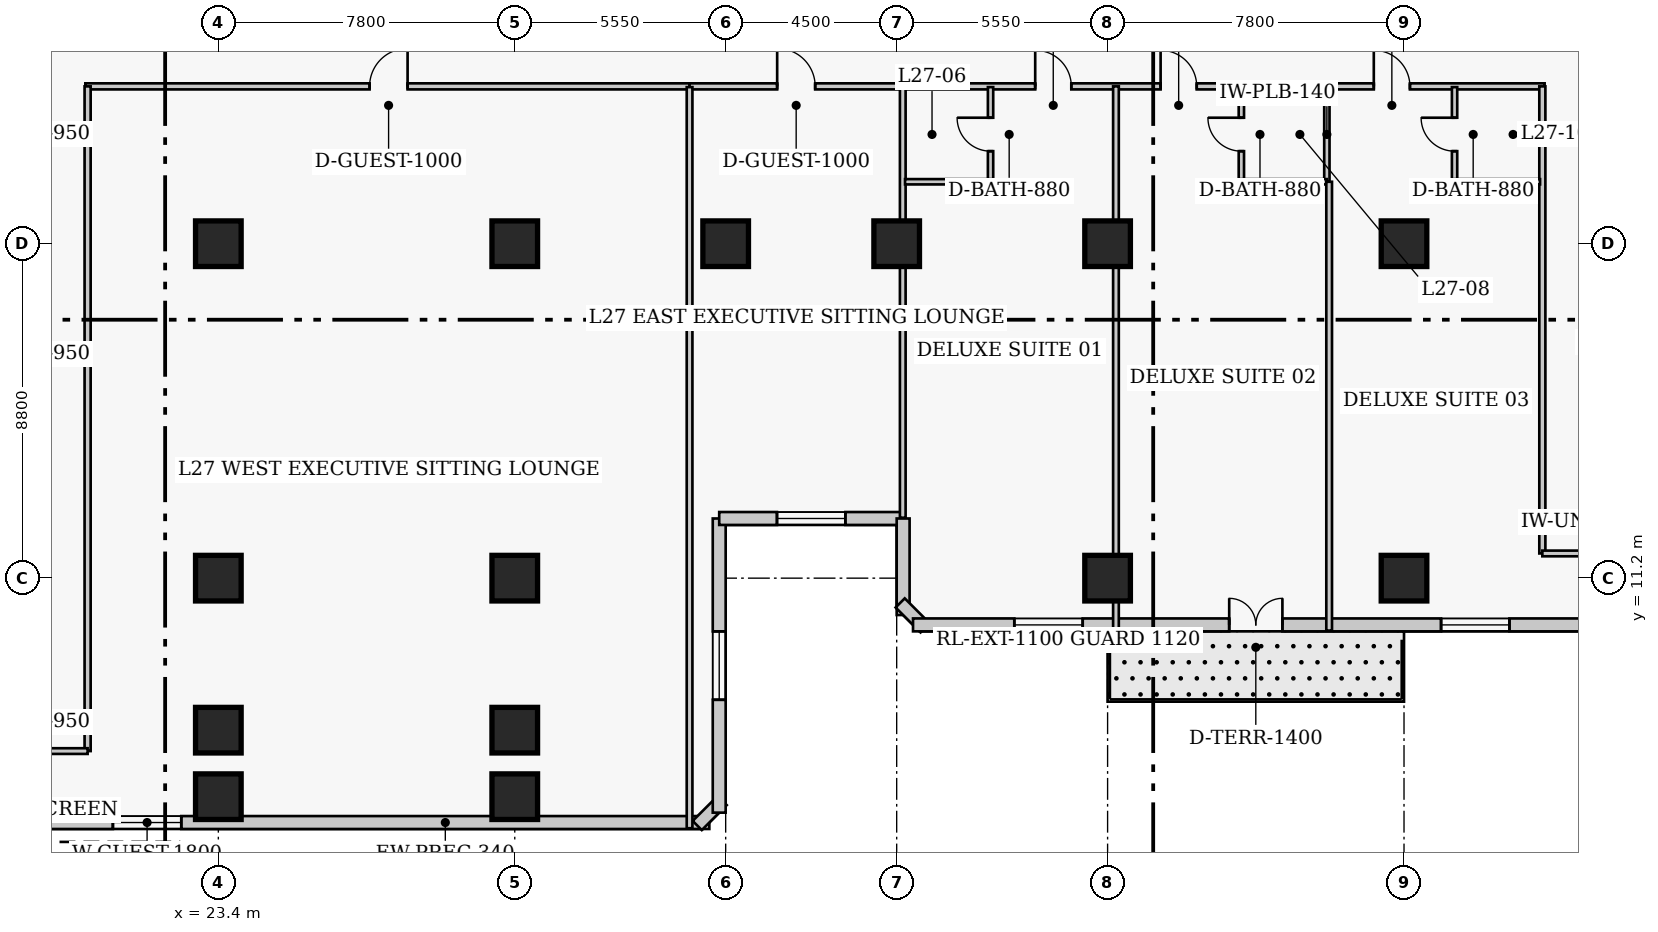
"""IFC4 building model, lengths in metres.
Left out: names, types, materials, properties, quantities, classifications, styles, units other than length and angle.
Written with IfcOpenShell. Run it as: python <this file> out.ifc"""

import sys

from ifc_helpers import new_model, si_unit, direction, frame, frame_2d, origin, origin_2d, place, context, subcontext, project, spatial, rectangle, extrude, element, fill, save


model = new_model("IFC4")
c1 = context("Model", 3, precision=1e-05, world=origin(), true_north=direction((0.0, 1.0)))
c2 = subcontext(c1, "Body", "Model", "MODEL_VIEW")
j1 = project(units=[si_unit("LENGTHUNIT", "METRE"), si_unit("PLANEANGLEUNIT", "RADIAN")], contexts=[c1])
p1 = place(None, origin())
s1 = spatial("IfcSite", under=j1, at=p1, CompositionType="ELEMENT")
p2 = place(p1, origin())
s2 = spatial("IfcBuilding", under=s1, at=p2, CompositionType="ELEMENT")
p3 = place(p2, frame((0.0, 0.0, 110.8)))
s3 = spatial("IfcBuildingStorey", under=s2, at=p3, CompositionType="ELEMENT", Elevation=110.8)
for number, where, z_axis, x_axis in (
    (1, (23.4, 11.2, 0.0), (0.0, 0.0, 1.0), (1.0, 0.0, 0.0)),
    (2, (23.4, 20.0, 0.0), (0.0, 0.0, 1.0), (1.0, 0.0, 0.0)),
    (3, (31.2, 11.2, 0.0), (0.0, 0.0, 1.0), (1.0, 0.0, 0.0)),
    (4, (31.2, 20.0, 0.0), (0.0, 0.0, 1.0), (1.0, 0.0, 0.0)),
    (5, (36.75, 20.0, 0.0), (0.0, 0.0, 1.0), (1.0, 0.0, 0.0)),
    (6, (41.25, 20.0, 0.0), (0.0, 0.0, 1.0), (1.0, 0.0, 0.0)),
    (7, (46.8, 11.2, 0.0), (0.0, 0.0, 1.0), (1.0, 0.0, 0.0)),
    (8, (46.8, 20.0, 0.0), (0.0, 0.0, 1.0), (1.0, 0.0, 0.0)),
    (9, (54.6, 11.2, 0.0), (0.0, 0.0, 1.0), (1.0, 0.0, 0.0)),
    (10, (54.6, 20.0, 0.0), (0.0, 0.0, 1.0), (1.0, 0.0, 0.0)),
    (11, (23.4, 7.2, 0.0), (0.0, 0.0, 1.0), (1.0, 0.0, 0.0)),
    (12, (31.2, 7.2, 0.0), (0.0, 0.0, 1.0), (1.0, 0.0, 0.0)),
    (13, (23.4, 5.45, 0.0), (0.0, 0.0, 1.0), (1.0, 0.0, 0.0)),
    (14, (31.2, 5.45, 0.0), (0.0, 0.0, 1.0), (1.0, 0.0, 0.0)),
):
    element("IfcColumn", number, at=place(p3, frame(where, z_axis=z_axis, x_axis=x_axis)), inside=s3, PredefinedType="COLUMN", context=c2, shape_type="SweptSolid", body=[
        extrude(rectangle(XDim=1.2, YDim=1.2, at=origin_2d()), origin(), (0.0, 0.0, 1.0), 3.8),
    ])
p4 = place(p3, frame((8.03, 4.77, 0.0), z_axis=(0.0, 0.0, 1.0), x_axis=(1.0, 0.0, 0.0)))
e15 = element("IfcWall", 15, at=p4, inside=s3, PredefinedType="SOLIDWALL", context=c2, shape_type="SweptSolid", body=[
    extrude(rectangle(XDim=28.29, YDim=0.34, at=frame_2d((14.145, 0.0))), origin(), (0.0, 0.0, 1.0), 3.54),
])
p5 = place(p4, frame((12.595, 0.0, 0.85)))
e16 = element("IfcOpeningElement", 16, at=p5, cuts=e15, PredefinedType="OPENING", context=c2, shape_type="SweptSolid", body=[
    extrude(rectangle(XDim=1.8, YDim=1.8, at=frame_2d((0.9, 0.9))), frame((0.0, 0.18, 0.0), z_axis=(0.0, -1.0, 0.0), x_axis=(1.0, 0.0, 0.0)), (0.0, 0.0, 1.0), 0.36),
])
p6 = place(p3, frame((36.001, 4.692, 0.0), z_axis=(0.0, 0.0, 1.0), x_axis=(0.707238225886, 0.706975312048, 0.0)))
e17 = element("IfcWall", 17, at=p6, inside=s3, PredefinedType="SOLIDWALL", context=c2, shape_type="SweptSolid", body=[
    extrude(rectangle(XDim=0.929, YDim=0.34, at=frame_2d((0.464, 0.0))), origin(), (0.0, 0.0, 1.0), 3.54),
])
p7 = place(p3, frame((36.58, 5.03, 0.0), z_axis=(0.0, 0.0, 1.0), x_axis=(0.0, 1.0, 0.0)))
e18 = element("IfcWall", 18, at=p7, inside=s3, PredefinedType="SOLIDWALL", context=c2, shape_type="SweptSolid", body=[
    extrude(rectangle(XDim=7.74, YDim=0.34, at=frame_2d((3.87, 0.0))), origin(), (0.0, 0.0, 1.0), 3.54),
])
p8 = place(p7, frame((2.97, 0.0, 0.85)))
e19 = element("IfcOpeningElement", 19, at=p8, cuts=e18, PredefinedType="OPENING", context=c2, shape_type="SweptSolid", body=[
    extrude(rectangle(XDim=1.8, YDim=1.8, at=frame_2d((0.9, 0.9))), frame((0.0, 0.18, 0.0), z_axis=(0.0, -1.0, 0.0), x_axis=(1.0, 0.0, 0.0)), (0.0, 0.0, 1.0), 0.36),
])
p9 = place(p3, frame((36.58, 12.77, 0.0), z_axis=(0.0, 0.0, 1.0), x_axis=(1.0, 0.0, 0.0)))
e20 = element("IfcWall", 20, at=p9, inside=s3, PredefinedType="SOLIDWALL", context=c2, shape_type="SweptSolid", body=[
    extrude(rectangle(XDim=4.84, YDim=0.34, at=frame_2d((2.42, 0.0))), origin(), (0.0, 0.0, 1.0), 3.54),
])
p10 = place(p9, frame((1.52, 0.0, 0.85)))
e21 = element("IfcOpeningElement", 21, at=p10, cuts=e20, PredefinedType="OPENING", context=c2, shape_type="SweptSolid", body=[
    extrude(rectangle(XDim=1.8, YDim=1.8, at=frame_2d((0.9, 0.9))), frame((0.0, 0.18, 0.0), z_axis=(0.0, -1.0, 0.0), x_axis=(1.0, 0.0, 0.0)), (0.0, 0.0, 1.0), 0.36),
])
p11 = place(p3, frame((41.42, 12.77, 0.0), z_axis=(0.0, 0.0, 1.0), x_axis=(0.0, -1.0, 0.0)))
e22 = element("IfcWall", 22, at=p11, inside=s3, PredefinedType="SOLIDWALL", context=c2, shape_type="SweptSolid", body=[
    extrude(rectangle(XDim=2.54, YDim=0.34, at=frame_2d((1.27, 0.0))), origin(), (0.0, 0.0, 1.0), 3.54),
])
p12 = place(p3, frame((41.342, 10.549, 0.0), z_axis=(0.0, 0.0, 1.0), x_axis=(0.707106781187, -0.707106781187, 0.0)))
e23 = element("IfcWall", 23, at=p12, inside=s3, PredefinedType="SOLIDWALL", context=c2, shape_type="SweptSolid", body=[
    extrude(rectangle(XDim=0.929, YDim=0.34, at=frame_2d((0.464, 0.0))), origin(), (0.0, 0.0, 1.0), 3.54),
])
p13 = place(p3, frame((41.68, 9.97, 0.0), z_axis=(0.0, 0.0, 1.0), x_axis=(1.0, 0.0, 0.0)))
e24 = element("IfcWall", 24, at=p13, inside=s3, PredefinedType="SOLIDWALL", context=c2, shape_type="SweptSolid", body=[
    extrude(rectangle(XDim=28.29, YDim=0.34, at=frame_2d((14.145, 0.0))), origin(), (0.0, 0.0, 1.0), 3.54),
])
p14 = place(p13, frame((8.32, 0.0, 0.0)))
e25 = element("IfcOpeningElement", 25, at=p14, cuts=e24, PredefinedType="OPENING", context=c2, shape_type="SweptSolid", body=[
    extrude(rectangle(XDim=1.4, YDim=2.15, at=frame_2d((0.7, 1.075))), frame((0.0, 0.18, 0.0), z_axis=(0.0, -1.0, 0.0), x_axis=(1.0, 0.0, 0.0)), (0.0, 0.0, 1.0), 0.36),
])
p15 = place(p13, frame((2.665, 0.0, 0.85)))
e26 = element("IfcOpeningElement", 26, at=p15, cuts=e24, PredefinedType="OPENING", context=c2, shape_type="SweptSolid", body=[
    extrude(rectangle(XDim=1.8, YDim=1.8, at=frame_2d((0.9, 0.9))), frame((0.0, 0.18, 0.0), z_axis=(0.0, -1.0, 0.0), x_axis=(1.0, 0.0, 0.0)), (0.0, 0.0, 1.0), 0.36),
])
p16 = place(p13, frame((13.895, 0.0, 0.85)))
e27 = element("IfcOpeningElement", 27, at=p16, cuts=e24, PredefinedType="OPENING", context=c2, shape_type="SweptSolid", body=[
    extrude(rectangle(XDim=1.8, YDim=1.8, at=frame_2d((0.9, 0.9))), frame((0.0, 0.18, 0.0), z_axis=(0.0, -1.0, 0.0), x_axis=(1.0, 0.0, 0.0)), (0.0, 0.0, 1.0), 0.36),
])
p17 = place(p3, frame((19.9, 24.14, 0.0), z_axis=(0.0, 0.0, 1.0), x_axis=(1.0, 0.0, 0.0)))
e28 = element("IfcWall", 28, at=p17, inside=s3, PredefinedType="PARTITIONING", context=c2, shape_type="SweptSolid", body=[
    extrude(rectangle(XDim=15.9, YDim=0.16, at=frame_2d((7.95, 0.0))), origin(), (0.0, 0.0, 1.0), 3.54),
])
p18 = place(p17, frame((7.48, 0.0, 0.0)))
e29 = element("IfcOpeningElement", 29, at=p18, cuts=e28, PredefinedType="OPENING", context=c2, shape_type="SweptSolid", body=[
    extrude(rectangle(XDim=1.0, YDim=2.15, at=frame_2d((0.5, 1.075))), frame((0.0, 0.09, 0.0), z_axis=(0.0, -1.0, 0.0), x_axis=(1.0, 0.0, 0.0)), (0.0, 0.0, 1.0), 0.18),
])
p19 = place(p3, frame((35.8, 24.14, 0.0), z_axis=(0.0, 0.0, 1.0), x_axis=(1.0, 0.0, 0.0)))
e30 = element("IfcWall", 30, at=p19, inside=s3, PredefinedType="PARTITIONING", context=c2, shape_type="SweptSolid", body=[
    extrude(rectangle(XDim=22.5, YDim=0.16, at=frame_2d((11.25, 0.0))), origin(), (0.0, 0.0, 1.0), 3.54),
])
p20 = place(p19, frame((2.305, 0.0, 0.0)))
e31 = element("IfcOpeningElement", 31, at=p20, cuts=e30, PredefinedType="OPENING", context=c2, shape_type="SweptSolid", body=[
    extrude(rectangle(XDim=1.0, YDim=2.15, at=frame_2d((0.5, 1.075))), frame((0.0, 0.09, 0.0), z_axis=(0.0, -1.0, 0.0), x_axis=(1.0, 0.0, 0.0)), (0.0, 0.0, 1.0), 0.18),
])
p21 = place(p19, frame((9.095, 0.0, 0.0)))
e32 = element("IfcOpeningElement", 32, at=p21, cuts=e30, PredefinedType="OPENING", context=c2, shape_type="SweptSolid", body=[
    extrude(rectangle(XDim=0.95, YDim=2.1, at=frame_2d((0.475, 1.05))), frame((0.0, 0.09, 0.0), z_axis=(0.0, -1.0, 0.0), x_axis=(1.0, 0.0, 0.0)), (0.0, 0.0, 1.0), 0.18),
])
p22 = place(p19, frame((12.395, 0.0, 0.0)))
e33 = element("IfcOpeningElement", 33, at=p22, cuts=e30, PredefinedType="OPENING", context=c2, shape_type="SweptSolid", body=[
    extrude(rectangle(XDim=0.95, YDim=2.1, at=frame_2d((0.475, 1.05))), frame((0.0, 0.09, 0.0), z_axis=(0.0, -1.0, 0.0), x_axis=(1.0, 0.0, 0.0)), (0.0, 0.0, 1.0), 0.18),
])
p23 = place(p19, frame((18.005, 0.0, 0.0)))
e34 = element("IfcOpeningElement", 34, at=p23, cuts=e30, PredefinedType="OPENING", context=c2, shape_type="SweptSolid", body=[
    extrude(rectangle(XDim=0.95, YDim=2.1, at=frame_2d((0.475, 1.05))), frame((0.0, 0.09, 0.0), z_axis=(0.0, -1.0, 0.0), x_axis=(1.0, 0.0, 0.0)), (0.0, 0.0, 1.0), 0.18),
])
p24 = place(p3, frame((19.96, 6.65, 0.0), z_axis=(0.0, 0.0, 1.0), x_axis=(0.0, 1.0, 0.0)))
e35 = element("IfcWall", 35, at=p24, inside=s3, PredefinedType="PARTITIONING", context=c2, shape_type="SweptSolid", body=[
    extrude(rectangle(XDim=17.49, YDim=0.16, at=frame_2d((8.745, 0.0))), origin(), (0.0, 0.0, 1.0), 3.54),
])
p25 = place(p3, frame((58.24, 11.85, 0.0), z_axis=(0.0, 0.0, 1.0), x_axis=(0.0, 1.0, 0.0)))
e36 = element("IfcWall", 36, at=p25, inside=s3, PredefinedType="PARTITIONING", context=c2, shape_type="SweptSolid", body=[
    extrude(rectangle(XDim=12.29, YDim=0.16, at=frame_2d((6.145, 0.0))), origin(), (0.0, 0.0, 1.0), 3.54),
])
for number, where, z_axis, x_axis in (
    (37, (58.24, 11.85, 0.0), (0.0, 0.0, 1.0), (1.0, 0.0, 0.0)),
    (38, (17.74, 6.65, 0.0), (0.0, 0.0, 1.0), (1.0, 0.0, 0.0)),
):
    element("IfcWall", number, at=place(p3, frame(where, z_axis=z_axis, x_axis=x_axis)), inside=s3, PredefinedType="PARTITIONING", context=c2, shape_type="SweptSolid", body=[
        extrude(rectangle(XDim=2.22, YDim=0.15, at=frame_2d((1.11, 0.0))), origin(), (0.0, 0.0, 1.0), 3.54),
    ])
p26 = place(p3, frame((35.8, 4.62, 0.0), z_axis=(0.0, 0.0, 1.0), x_axis=(0.0, 1.0, 0.0)))
e39 = element("IfcWall", 39, at=p26, inside=s3, PredefinedType="PARTITIONING", context=c2, shape_type="SweptSolid", body=[
    extrude(rectangle(XDim=19.5, YDim=0.15, at=frame_2d((9.75, 0.0))), origin(), (0.0, 0.0, 1.0), 3.54),
])
p27 = place(p3, frame((41.41, 12.79, 0.0), z_axis=(0.0, 0.0, 1.0), x_axis=(0.0, 1.0, 0.0)))
e40 = element("IfcWall", 40, at=p27, inside=s3, PredefinedType="PARTITIONING", context=c2, shape_type="SweptSolid", body=[
    extrude(rectangle(XDim=11.35, YDim=0.15, at=frame_2d((5.675, 0.0))), origin(), (0.0, 0.0, 1.0), 3.54),
])
p28 = place(p3, frame((43.72, 21.63, 0.0), z_axis=(0.0, 0.0, 1.0), x_axis=(0.0, 1.0, 0.0)))
e41 = element("IfcWall", 41, at=p28, inside=s3, PredefinedType="PLUMBINGWALL", context=c2, shape_type="SweptSolid", body=[
    extrude(rectangle(XDim=2.49, YDim=0.14, at=frame_2d((1.245, 0.0))), origin(), (0.0, 0.0, 1.0), 3.54),
])
p29 = place(p28, frame((0.805, 0.0, 0.0)))
e42 = element("IfcOpeningElement", 42, at=p29, cuts=e41, PredefinedType="OPENING", context=c2, shape_type="SweptSolid", body=[
    extrude(rectangle(XDim=0.88, YDim=2.05, at=frame_2d((0.44, 1.025))), frame((0.0, 0.08, 0.0), z_axis=(0.0, -1.0, 0.0), x_axis=(1.0, 0.0, 0.0)), (0.0, 0.0, 1.0), 0.16),
])
p30 = place(p3, frame((41.47, 21.63, 0.0), z_axis=(0.0, 0.0, 1.0), x_axis=(1.0, 0.0, 0.0)))
e43 = element("IfcWall", 43, at=p30, inside=s3, PredefinedType="PLUMBINGWALL", context=c2, shape_type="SweptSolid", body=[
    extrude(rectangle(XDim=2.25, YDim=0.14, at=frame_2d((1.125, 0.0))), origin(), (0.0, 0.0, 1.0), 3.54),
])
p31 = place(p3, frame((47.02, 9.82, 0.0), z_axis=(0.0, 0.0, 1.0), x_axis=(0.0, 1.0, 0.0)))
e44 = element("IfcWall", 44, at=p31, inside=s3, PredefinedType="PARTITIONING", context=c2, shape_type="SweptSolid", body=[
    extrude(rectangle(XDim=14.32, YDim=0.15, at=frame_2d((7.16, 0.0))), origin(), (0.0, 0.0, 1.0), 2.679),
])
p32 = place(p3, frame((50.32, 21.63, 0.0), z_axis=(0.0, 0.0, 1.0), x_axis=(0.0, 1.0, 0.0)))
e45 = element("IfcWall", 45, at=p32, inside=s3, PredefinedType="PLUMBINGWALL", context=c2, shape_type="SweptSolid", body=[
    extrude(rectangle(XDim=2.49, YDim=0.14, at=frame_2d((1.245, 0.0))), origin(), (0.0, 0.0, 1.0), 3.54),
])
p33 = place(p32, frame((0.805, 0.0, 0.0)))
e46 = element("IfcOpeningElement", 46, at=p33, cuts=e45, PredefinedType="OPENING", context=c2, shape_type="SweptSolid", body=[
    extrude(rectangle(XDim=0.88, YDim=2.05, at=frame_2d((0.44, 1.025))), frame((0.0, 0.08, 0.0), z_axis=(0.0, -1.0, 0.0), x_axis=(1.0, 0.0, 0.0)), (0.0, 0.0, 1.0), 0.16),
])
p34 = place(p3, frame((52.57, 21.63, 0.0), z_axis=(0.0, 0.0, 1.0), x_axis=(0.0, 1.0, 0.0)))
e47 = element("IfcWall", 47, at=p34, inside=s3, PredefinedType="PLUMBINGWALL", context=c2, shape_type="SweptSolid", body=[
    extrude(rectangle(XDim=2.49, YDim=0.14, at=frame_2d((1.245, 0.0))), origin(), (0.0, 0.0, 1.0), 3.54),
])
p35 = place(p3, frame((50.32, 21.63, 0.0), z_axis=(0.0, 0.0, 1.0), x_axis=(1.0, 0.0, 0.0)))
e48 = element("IfcWall", 48, at=p35, inside=s3, PredefinedType="PLUMBINGWALL", context=c2, shape_type="SweptSolid", body=[
    extrude(rectangle(XDim=2.25, YDim=0.14, at=frame_2d((1.125, 0.0))), origin(), (0.0, 0.0, 1.0), 3.54),
])
p36 = place(p3, frame((52.63, 9.82, 0.0), z_axis=(0.0, 0.0, 1.0), x_axis=(0.0, 1.0, 0.0)))
e49 = element("IfcWall", 49, at=p36, inside=s3, PredefinedType="PARTITIONING", context=c2, shape_type="SweptSolid", body=[
    extrude(rectangle(XDim=11.81, YDim=0.15, at=frame_2d((5.905, 0.0))), origin(), (0.0, 0.0, 1.0), 3.54),
])
p37 = place(p3, frame((55.93, 21.63, 0.0), z_axis=(0.0, 0.0, 1.0), x_axis=(0.0, 1.0, 0.0)))
e50 = element("IfcWall", 50, at=p37, inside=s3, PredefinedType="PLUMBINGWALL", context=c2, shape_type="SweptSolid", body=[
    extrude(rectangle(XDim=2.49, YDim=0.14, at=frame_2d((1.245, 0.0))), origin(), (0.0, 0.0, 1.0), 3.54),
])
p38 = place(p37, frame((0.805, 0.0, 0.0)))
e51 = element("IfcOpeningElement", 51, at=p38, cuts=e50, PredefinedType="OPENING", context=c2, shape_type="SweptSolid", body=[
    extrude(rectangle(XDim=0.88, YDim=2.05, at=frame_2d((0.44, 1.025))), frame((0.0, 0.08, 0.0), z_axis=(0.0, -1.0, 0.0), x_axis=(1.0, 0.0, 0.0)), (0.0, 0.0, 1.0), 0.16),
])
p39 = place(p3, frame((55.93, 21.63, 0.0), z_axis=(0.0, 0.0, 1.0), x_axis=(1.0, 0.0, 0.0)))
e52 = element("IfcWall", 52, at=p39, inside=s3, PredefinedType="PLUMBINGWALL", context=c2, shape_type="SweptSolid", body=[
    extrude(rectangle(XDim=2.25, YDim=0.14, at=frame_2d((1.125, 0.0))), origin(), (0.0, 0.0, 1.0), 3.54),
])
p40 = place(p5, origin())
e53 = element("IfcWindow", 53, at=p40, inside=s3, PartitioningType="SINGLE_PANEL", PredefinedType="WINDOW", context=c2, shape_type="SweptSolid", body=[
    extrude(rectangle(XDim=1.8, YDim=1.8, at=frame_2d((0.9, 0.9))), frame((0.0, 0.03, 0.0), z_axis=(0.0, -1.0, 0.0), x_axis=(1.0, 0.0, 0.0)), (0.0, 0.0, 1.0), 0.06),
])
fill(e16, e53)
p41 = place(p8, origin())
e54 = element("IfcWindow", 54, at=p41, inside=s3, PartitioningType="SINGLE_PANEL", PredefinedType="WINDOW", context=c2, shape_type="SweptSolid", body=[
    extrude(rectangle(XDim=1.8, YDim=1.8, at=frame_2d((0.9, 0.9))), frame((0.0, 0.03, 0.0), z_axis=(0.0, -1.0, 0.0), x_axis=(1.0, 0.0, 0.0)), (0.0, 0.0, 1.0), 0.06),
])
fill(e19, e54)
p42 = place(p10, origin())
e55 = element("IfcWindow", 55, at=p42, inside=s3, PartitioningType="SINGLE_PANEL", PredefinedType="WINDOW", context=c2, shape_type="SweptSolid", body=[
    extrude(rectangle(XDim=1.8, YDim=1.8, at=frame_2d((0.9, 0.9))), frame((0.0, 0.03, 0.0), z_axis=(0.0, -1.0, 0.0), x_axis=(1.0, 0.0, 0.0)), (0.0, 0.0, 1.0), 0.06),
])
fill(e21, e55)
p43 = place(p14, origin())
e56 = element("IfcDoor", 56, at=p43, inside=s3, OperationType="DOUBLE_DOOR_SINGLE_SWING", PredefinedType="DOOR", context=c2, shape_type="SweptSolid", body=[
    extrude(rectangle(XDim=1.4, YDim=2.15, at=frame_2d((0.7, 1.075))), frame((0.0, 0.025, 0.0), z_axis=(0.0, -1.0, 0.0), x_axis=(1.0, 0.0, 0.0)), (0.0, 0.0, 1.0), 0.05),
])
fill(e25, e56)
p44 = place(p15, origin())
e57 = element("IfcWindow", 57, at=p44, inside=s3, PartitioningType="SINGLE_PANEL", PredefinedType="WINDOW", context=c2, shape_type="SweptSolid", body=[
    extrude(rectangle(XDim=1.8, YDim=1.8, at=frame_2d((0.9, 0.9))), frame((0.0, 0.03, 0.0), z_axis=(0.0, -1.0, 0.0), x_axis=(1.0, 0.0, 0.0)), (0.0, 0.0, 1.0), 0.06),
])
fill(e26, e57)
p45 = place(p16, origin())
e58 = element("IfcWindow", 58, at=p45, inside=s3, PartitioningType="SINGLE_PANEL", PredefinedType="WINDOW", context=c2, shape_type="SweptSolid", body=[
    extrude(rectangle(XDim=1.8, YDim=1.8, at=frame_2d((0.9, 0.9))), frame((0.0, 0.03, 0.0), z_axis=(0.0, -1.0, 0.0), x_axis=(1.0, 0.0, 0.0)), (0.0, 0.0, 1.0), 0.06),
])
fill(e27, e58)
p46 = place(p18, origin())
e59 = element("IfcDoor", 59, at=p46, inside=s3, OperationType="SINGLE_SWING_RIGHT", PredefinedType="DOOR", context=c2, shape_type="SweptSolid", body=[
    extrude(rectangle(XDim=1.0, YDim=2.15, at=frame_2d((0.5, 1.075))), frame((0.0, 0.025, 0.0), z_axis=(0.0, -1.0, 0.0), x_axis=(1.0, 0.0, 0.0)), (0.0, 0.0, 1.0), 0.05),
])
fill(e29, e59)
p47 = place(p20, origin())
e60 = element("IfcDoor", 60, at=p47, inside=s3, OperationType="SINGLE_SWING_LEFT", PredefinedType="DOOR", context=c2, shape_type="SweptSolid", body=[
    extrude(rectangle(XDim=1.0, YDim=2.15, at=frame_2d((0.5, 1.075))), frame((0.0, 0.025, 0.0), z_axis=(0.0, -1.0, 0.0), x_axis=(1.0, 0.0, 0.0)), (0.0, 0.0, 1.0), 0.05),
])
fill(e31, e60)
p48 = place(p29, origin())
e61 = element("IfcDoor", 61, at=p48, inside=s3, OperationType="SINGLE_SWING_RIGHT", PredefinedType="DOOR", context=c2, shape_type="SweptSolid", body=[
    extrude(rectangle(XDim=0.88, YDim=2.05, at=frame_2d((0.44, 1.025))), frame((0.0, 0.025, 0.0), z_axis=(0.0, -1.0, 0.0), x_axis=(1.0, 0.0, 0.0)), (0.0, 0.0, 1.0), 0.05),
])
fill(e42, e61)
p49 = place(p21, origin())
e62 = element("IfcDoor", 62, at=p49, inside=s3, OperationType="SINGLE_SWING_LEFT", PredefinedType="DOOR", context=c2, shape_type="SweptSolid", body=[
    extrude(rectangle(XDim=0.95, YDim=2.1, at=frame_2d((0.475, 1.05))), frame((0.0, 0.025, 0.0), z_axis=(0.0, -1.0, 0.0), x_axis=(1.0, 0.0, 0.0)), (0.0, 0.0, 1.0), 0.05),
])
fill(e32, e62)
p50 = place(p33, origin())
e63 = element("IfcDoor", 63, at=p50, inside=s3, OperationType="SINGLE_SWING_RIGHT", PredefinedType="DOOR", context=c2, shape_type="SweptSolid", body=[
    extrude(rectangle(XDim=0.88, YDim=2.05, at=frame_2d((0.44, 1.025))), frame((0.0, 0.025, 0.0), z_axis=(0.0, -1.0, 0.0), x_axis=(1.0, 0.0, 0.0)), (0.0, 0.0, 1.0), 0.05),
])
fill(e46, e63)
p51 = place(p22, origin())
e64 = element("IfcDoor", 64, at=p51, inside=s3, OperationType="SINGLE_SWING_LEFT", PredefinedType="DOOR", context=c2, shape_type="SweptSolid", body=[
    extrude(rectangle(XDim=0.95, YDim=2.1, at=frame_2d((0.475, 1.05))), frame((0.0, 0.025, 0.0), z_axis=(0.0, -1.0, 0.0), x_axis=(1.0, 0.0, 0.0)), (0.0, 0.0, 1.0), 0.05),
])
fill(e33, e64)
p52 = place(p38, origin())
e65 = element("IfcDoor", 65, at=p52, inside=s3, OperationType="SINGLE_SWING_RIGHT", PredefinedType="DOOR", context=c2, shape_type="SweptSolid", body=[
    extrude(rectangle(XDim=0.88, YDim=2.05, at=frame_2d((0.44, 1.025))), frame((0.0, 0.025, 0.0), z_axis=(0.0, -1.0, 0.0), x_axis=(1.0, 0.0, 0.0)), (0.0, 0.0, 1.0), 0.05),
])
fill(e51, e65)
p53 = place(p23, origin())
e66 = element("IfcDoor", 66, at=p53, inside=s3, OperationType="SINGLE_SWING_LEFT", PredefinedType="DOOR", context=c2, shape_type="SweptSolid", body=[
    extrude(rectangle(XDim=0.95, YDim=2.1, at=frame_2d((0.475, 1.05))), frame((0.0, 0.025, 0.0), z_axis=(0.0, -1.0, 0.0), x_axis=(1.0, 0.0, 0.0)), (0.0, 0.0, 1.0), 0.05),
])
fill(e34, e66)
save(model, sys.argv[1])
